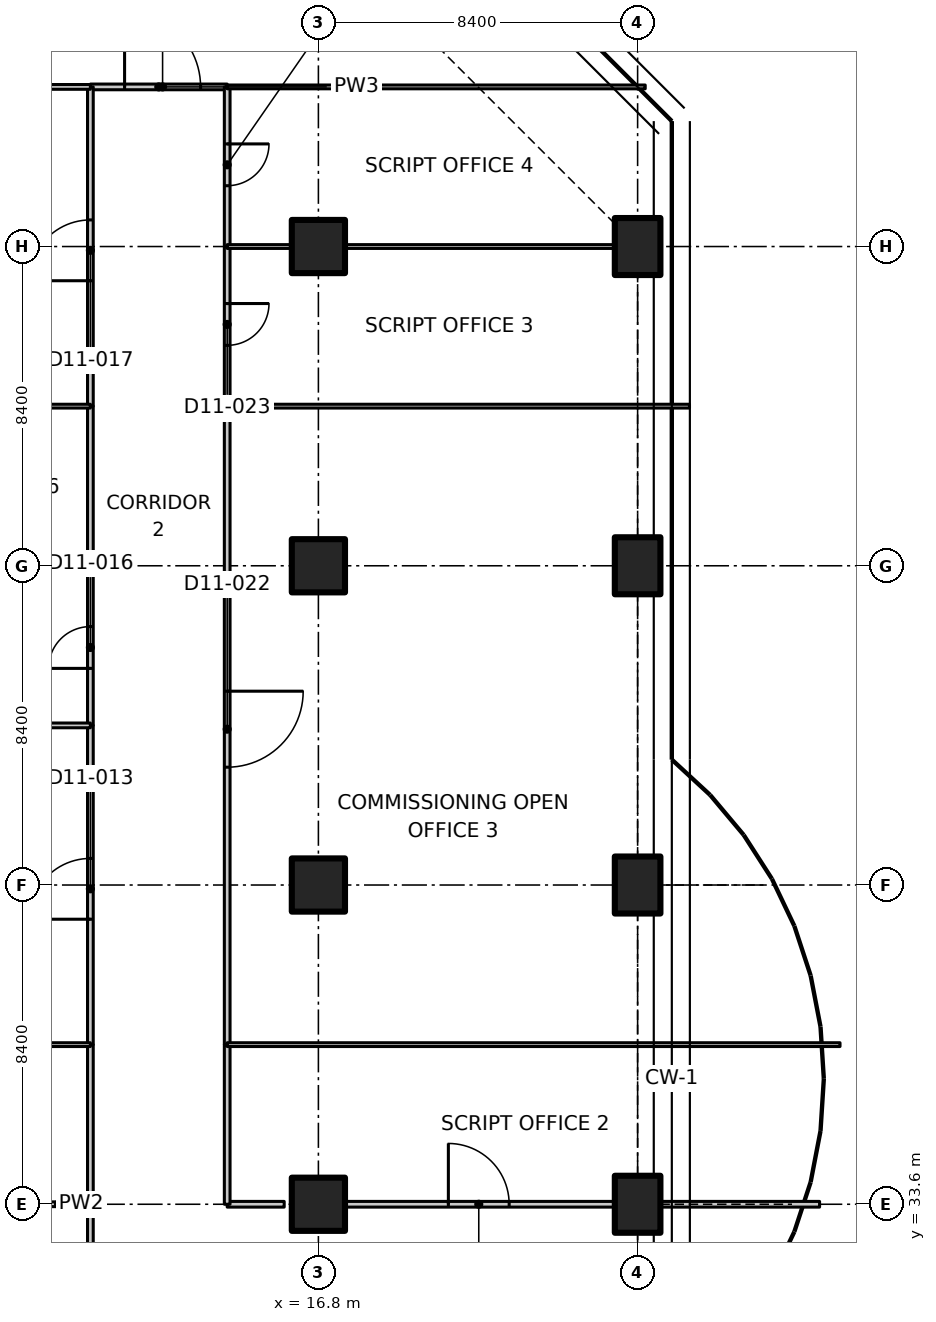
"""IFC4 building model, lengths in metres.
Left out: names, types, materials, properties, quantities, classifications, styles, units other than length and angle.
Written with IfcOpenShell. Run it as: python <this file> out.ifc"""

import sys

from ifc_helpers import new_model, si_unit, direction, frame, frame_2d, origin, origin_2d, place, context, subcontext, project, spatial, polyline, rectangle, outline, extrude, element, fill, save


model = new_model("IFC4")
c1 = context("Model", 3, precision=1e-05, world=origin(), true_north=direction((0.0, 1.0)))
c2 = subcontext(c1, "Body", "Model", "MODEL_VIEW")
j1 = project(units=[si_unit("LENGTHUNIT", "METRE"), si_unit("PLANEANGLEUNIT", "RADIAN")], contexts=[c1])
p1 = place(None, origin())
s1 = spatial("IfcSite", under=j1, at=p1, CompositionType="ELEMENT")
p2 = place(p1, origin())
s2 = spatial("IfcBuilding", under=s1, at=p2, CompositionType="ELEMENT")
p3 = place(p2, frame((0.0, 0.0, 83.3)))
s3 = spatial("IfcBuildingStorey", under=s2, at=p3, CompositionType="ELEMENT", Elevation=83.3)
for number, where, z_axis, x_axis in (
    (1, (16.8, 33.6, 0.0), (0.0, 0.0, 1.0), (1.0, 0.0, 0.0)),
    (2, (16.8, 42.0, 0.0), (0.0, 0.0, 1.0), (1.0, 0.0, 0.0)),
    (3, (16.8, 50.4, 0.0), (0.0, 0.0, 1.0), (1.0, 0.0, 0.0)),
    (4, (16.8, 58.8, 0.0), (0.0, 0.0, 1.0), (1.0, 0.0, 0.0)),
):
    element("IfcColumn", number, at=place(p3, frame(where, z_axis=z_axis, x_axis=x_axis)), inside=s3, PredefinedType="COLUMN", context=c2, shape_type="SweptSolid", body=[
        extrude(rectangle(XDim=1.4, YDim=1.4, at=origin_2d()), origin(), (0.0, 0.0, 1.0), 3.3),
    ])
for number, where, z_axis, x_axis in (
    (5, (25.2, 33.6, 0.0), (0.0, 0.0, 1.0), (1.0, 0.0, 0.0)),
    (6, (25.2, 42.0, 0.0), (0.0, 0.0, 1.0), (1.0, 0.0, 0.0)),
    (7, (25.2, 50.4, 0.0), (0.0, 0.0, 1.0), (1.0, 0.0, 0.0)),
    (8, (25.2, 58.8, 0.0), (0.0, 0.0, 1.0), (1.0, 0.0, 0.0)),
):
    element("IfcColumn", number, at=place(p3, frame(where, z_axis=z_axis, x_axis=x_axis)), inside=s3, PredefinedType="COLUMN", context=c2, shape_type="SweptSolid", body=[
        extrude(rectangle(XDim=1.2, YDim=1.5, at=origin_2d()), origin(), (0.0, 0.0, 1.0), 3.3),
    ])
p4 = place(p3, frame((10.8, 25.2, 0.0), z_axis=(0.0, 0.0, 1.0), x_axis=(0.0, 1.0, 0.0)))
e9 = element("IfcWall", 9, at=p4, inside=s3, PredefinedType="PARTITIONING", context=c2, shape_type="SweptSolid", body=[
    extrude(rectangle(XDim=8.4, YDim=0.15, at=frame_2d((4.2, 0.0))), origin(), (0.0, 0.0, 1.0), 3.28),
])
p5 = place(p4, frame((3.3, 0.0, 0.0)))
e10 = element("IfcOpeningElement", 10, at=p5, cuts=e9, PredefinedType="OPENING", context=c2, shape_type="SweptSolid", body=[
    extrude(rectangle(XDim=1.6, YDim=2.1, at=frame_2d((0.8, 1.05))), frame((0.0, 0.085, 0.0), z_axis=(0.0, -1.0, 0.0), x_axis=(1.0, 0.0, 0.0)), (0.0, 0.0, 1.0), 0.17),
])
p6 = place(p3, frame((14.4, 33.6, 0.0), z_axis=(0.0, 0.0, 1.0), x_axis=(1.0, 0.0, 0.0)))
e11 = element("IfcWall", 11, at=p6, inside=s3, PredefinedType="PARTITIONING", context=c2, shape_type="SweptSolid", body=[
    extrude(rectangle(XDim=1.5, YDim=0.15, at=frame_2d((0.75, 0.0))), origin(), (0.0, 0.0, 1.0), 3.28),
])
p7 = place(p3, frame((17.52, 33.6, 0.0), z_axis=(0.0, 0.0, 1.0), x_axis=(1.0, 0.0, 0.0)))
e12 = element("IfcWall", 12, at=p7, inside=s3, PredefinedType="PARTITIONING", context=c2, shape_type="SweptSolid", body=[
    extrude(rectangle(XDim=7.06, YDim=0.15, at=frame_2d((3.53, 0.0))), origin(), (0.0, 0.0, 1.0), 3.28),
])
p8 = place(p7, frame((2.7, 0.0, 0.0)))
e13 = element("IfcOpeningElement", 13, at=p8, cuts=e12, PredefinedType="OPENING", context=c2, shape_type="SweptSolid", body=[
    extrude(rectangle(XDim=1.6, YDim=2.1, at=frame_2d((0.8, 1.05))), frame((0.0, 0.085, 0.0), z_axis=(0.0, -1.0, 0.0), x_axis=(1.0, 0.0, 0.0)), (0.0, 0.0, 1.0), 0.17),
])
p9 = place(p3, frame((25.82, 33.6, 0.0), z_axis=(0.0, 0.0, 1.0), x_axis=(1.0, 0.0, 0.0)))
e14 = element("IfcWall", 14, at=p9, inside=s3, PredefinedType="PARTITIONING", context=c2, shape_type="SweptSolid", body=[
    extrude(rectangle(XDim=4.168, YDim=0.15, at=frame_2d((2.084, 0.0))), origin(), (0.0, 0.0, 1.0), 2.93),
])
p10 = place(p3, frame((10.8, 63.0, 0.0), z_axis=(0.0, 0.0, 1.0), x_axis=(1.0, 0.0, 0.0)))
e15 = element("IfcWall", 15, at=p10, inside=s3, PredefinedType="PARTITIONING", context=c2, shape_type="SweptSolid", body=[
    extrude(rectangle(XDim=3.6, YDim=0.15, at=frame_2d((1.8, 0.0))), origin(), (0.0, 0.0, 1.0), 3.28),
])
p11 = place(p10, frame((0.9, 0.0, 0.0)))
e16 = element("IfcOpeningElement", 16, at=p11, cuts=e15, PredefinedType="OPENING", context=c2, shape_type="SweptSolid", body=[
    extrude(rectangle(XDim=2.0, YDim=2.4, at=frame_2d((1.0, 1.2))), frame((0.0, 0.085, 0.0), z_axis=(0.0, -1.0, 0.0), x_axis=(1.0, 0.0, 0.0)), (0.0, 0.0, 1.0), 0.17),
])
p12 = place(p3, frame((10.8, 37.8, 0.0), z_axis=(0.0, 0.0, 1.0), x_axis=(0.0, 1.0, 0.0)))
e17 = element("IfcWall", 17, at=p12, inside=s3, PredefinedType="PARTITIONING", context=c2, shape_type="SweptSolid", body=[
    extrude(rectangle(XDim=8.4, YDim=0.15, at=frame_2d((4.2, 0.0))), origin(), (0.0, 0.0, 1.0), 3.28),
])
p13 = place(p12, frame((3.3, 0.0, 0.0)))
e18 = element("IfcOpeningElement", 18, at=p13, cuts=e17, PredefinedType="OPENING", context=c2, shape_type="SweptSolid", body=[
    extrude(rectangle(XDim=1.6, YDim=2.1, at=frame_2d((0.8, 1.05))), frame((0.0, 0.085, 0.0), z_axis=(0.0, -1.0, 0.0), x_axis=(1.0, 0.0, 0.0)), (0.0, 0.0, 1.0), 0.17),
])
p14 = place(p3, frame((10.8, 33.6, 0.0), z_axis=(0.0, 0.0, 1.0), x_axis=(0.0, 1.0, 0.0)))
e19 = element("IfcWall", 19, at=p14, inside=s3, PredefinedType="PARTITIONING", context=c2, shape_type="SweptSolid", body=[
    extrude(rectangle(XDim=4.2, YDim=0.15, at=frame_2d((2.1, 0.0))), origin(), (0.0, 0.0, 1.0), 3.28),
])
p15 = place(p3, frame((10.8, 46.2, 0.0), z_axis=(0.0, 0.0, 1.0), x_axis=(0.0, 1.0, 0.0)))
e20 = element("IfcWall", 20, at=p15, inside=s3, PredefinedType="PARTITIONING", context=c2, shape_type="SweptSolid", body=[
    extrude(rectangle(XDim=4.2, YDim=0.15, at=frame_2d((2.1, 0.0))), origin(), (0.0, 0.0, 1.0), 3.28),
])
p16 = place(p15, frame((1.5, 0.0, 0.0)))
e21 = element("IfcOpeningElement", 21, at=p16, cuts=e20, PredefinedType="OPENING", context=c2, shape_type="SweptSolid", body=[
    extrude(rectangle(XDim=1.1, YDim=2.1, at=frame_2d((0.55, 1.05))), frame((0.0, 0.085, 0.0), z_axis=(0.0, -1.0, 0.0), x_axis=(1.0, 0.0, 0.0)), (0.0, 0.0, 1.0), 0.17),
])
p17 = place(p3, frame((10.8, 54.6, 0.0), z_axis=(0.0, 0.0, 1.0), x_axis=(0.0, 1.0, 0.0)))
e22 = element("IfcWall", 22, at=p17, inside=s3, PredefinedType="PARTITIONING", context=c2, shape_type="SweptSolid", body=[
    extrude(rectangle(XDim=8.4, YDim=0.15, at=frame_2d((4.2, 0.0))), origin(), (0.0, 0.0, 1.0), 3.28),
])
p18 = place(p17, frame((3.3, 0.0, 0.0)))
e23 = element("IfcOpeningElement", 23, at=p18, cuts=e22, PredefinedType="OPENING", context=c2, shape_type="SweptSolid", body=[
    extrude(rectangle(XDim=1.6, YDim=2.1, at=frame_2d((0.8, 1.05))), frame((0.0, 0.085, 0.0), z_axis=(0.0, -1.0, 0.0), x_axis=(1.0, 0.0, 0.0)), (0.0, 0.0, 1.0), 0.17),
])
p19 = place(p3, frame((10.8, 50.4, 0.0), z_axis=(0.0, 0.0, 1.0), x_axis=(0.0, 1.0, 0.0)))
e24 = element("IfcWall", 24, at=p19, inside=s3, PredefinedType="PARTITIONING", context=c2, shape_type="SweptSolid", body=[
    extrude(rectangle(XDim=4.2, YDim=0.15, at=frame_2d((2.1, 0.0))), origin(), (0.0, 0.0, 1.0), 3.28),
])
p20 = place(p3, frame((14.4, 37.8, 0.0), z_axis=(0.0, 0.0, 1.0), x_axis=(0.0, -1.0, 0.0)))
e25 = element("IfcWall", 25, at=p20, inside=s3, PredefinedType="PARTITIONING", context=c2, shape_type="SweptSolid", body=[
    extrude(rectangle(XDim=4.2, YDim=0.15, at=frame_2d((2.1, 0.0))), origin(), (0.0, 0.0, 1.0), 3.28),
])
p21 = place(p3, frame((14.4, 54.6, 0.0), z_axis=(0.0, 0.0, 1.0), x_axis=(0.0, -1.0, 0.0)))
e26 = element("IfcWall", 26, at=p21, inside=s3, PredefinedType="PARTITIONING", context=c2, shape_type="SweptSolid", body=[
    extrude(rectangle(XDim=16.8, YDim=0.15, at=frame_2d((8.4, 0.0))), origin(), (0.0, 0.0, 1.0), 3.28),
])
p22 = place(p21, frame((7.5, 0.0, 0.0)))
e27 = element("IfcOpeningElement", 27, at=p22, cuts=e26, PredefinedType="OPENING", context=c2, shape_type="SweptSolid", body=[
    extrude(rectangle(XDim=2.0, YDim=2.4, at=frame_2d((1.0, 1.2))), frame((0.0, 0.085, 0.0), z_axis=(0.0, -1.0, 0.0), x_axis=(1.0, 0.0, 0.0)), (0.0, 0.0, 1.0), 0.17),
])
p23 = place(p3, frame((14.4, 58.8, 0.0), z_axis=(0.0, 0.0, 1.0), x_axis=(0.0, -1.0, 0.0)))
e28 = element("IfcWall", 28, at=p23, inside=s3, PredefinedType="PARTITIONING", context=c2, shape_type="SweptSolid", body=[
    extrude(rectangle(XDim=4.2, YDim=0.15, at=frame_2d((2.1, 0.0))), origin(), (0.0, 0.0, 1.0), 3.28),
])
p24 = place(p23, frame((1.5, 0.0, 0.0)))
e29 = element("IfcOpeningElement", 29, at=p24, cuts=e28, PredefinedType="OPENING", context=c2, shape_type="SweptSolid", body=[
    extrude(rectangle(XDim=1.1, YDim=2.1, at=frame_2d((0.55, 1.05))), frame((0.0, 0.085, 0.0), z_axis=(0.0, -1.0, 0.0), x_axis=(1.0, 0.0, 0.0)), (0.0, 0.0, 1.0), 0.17),
])
p25 = place(p3, frame((14.4, 63.0, 0.0), z_axis=(0.0, 0.0, 1.0), x_axis=(0.0, -1.0, 0.0)))
e30 = element("IfcWall", 30, at=p25, inside=s3, PredefinedType="PARTITIONING", context=c2, shape_type="SweptSolid", body=[
    extrude(rectangle(XDim=4.2, YDim=0.15, at=frame_2d((2.1, 0.0))), origin(), (0.0, 0.0, 1.0), 3.28),
])
p26 = place(p25, frame((1.5, 0.0, 0.0)))
e31 = element("IfcOpeningElement", 31, at=p26, cuts=e30, PredefinedType="OPENING", context=c2, shape_type="SweptSolid", body=[
    extrude(rectangle(XDim=1.1, YDim=2.1, at=frame_2d((0.55, 1.05))), frame((0.0, 0.085, 0.0), z_axis=(0.0, -1.0, 0.0), x_axis=(1.0, 0.0, 0.0)), (0.0, 0.0, 1.0), 0.17),
])
p27 = place(p3, frame((10.8, 63.0, 0.0), z_axis=(0.0, 0.0, 1.0), x_axis=(-1.0, 0.0, 0.0)))
e32 = element("IfcWall", 32, at=p27, inside=s3, PredefinedType="PARTITIONING", context=c2, shape_type="SweptSolid", body=[
    extrude(outline(polyline([(0.0, 0.0), (11.0, 0.0), (11.0, 3.28), (7.278, 3.28), (7.276, 2.93), (5.924, 2.93), (5.922, 3.28), (0.0, 3.28), (0.0, 0.0)])), frame((0.0, 0.062, 0.0), z_axis=(0.0, -1.0, 0.0), x_axis=(1.0, 0.0, 0.0)), (0.0, 0.0, 1.0), 0.125),
])
p28 = place(p3, frame((25.4, 63.0, 0.0), z_axis=(0.0, 0.0, 1.0), x_axis=(-1.0, 0.0, 0.0)))
e33 = element("IfcWall", 33, at=p28, inside=s3, PredefinedType="PARTITIONING", context=c2, shape_type="SweptSolid", body=[
    extrude(outline(polyline([(0.0, 0.0), (11.0, 0.0), (11.0, 3.28), (5.066, 3.28), (5.064, 2.93), (3.736, 2.93), (3.734, 3.28), (0.0, 3.28), (0.0, 0.0)])), frame((0.0, 0.05, 0.0), z_axis=(0.0, -1.0, 0.0), x_axis=(1.0, 0.0, 0.0)), (0.0, 0.0, 1.0), 0.1),
])
p29 = place(p3, frame((9.12, 33.6, 0.0), z_axis=(0.0, 0.0, 1.0), x_axis=(1.0, 0.0, 0.0)))
e34 = element("IfcWall", 34, at=p29, inside=s3, PredefinedType="PARTITIONING", context=c2, shape_type="SweptSolid", body=[
    extrude(rectangle(XDim=1.68, YDim=0.125, at=frame_2d((0.84, 0.0))), origin(), (0.0, 0.0, 1.0), 3.28),
])
p30 = place(p3, frame((10.8, 37.8, 0.0), z_axis=(0.0, 0.0, 1.0), x_axis=(-1.0, 0.0, 0.0)))
e35 = element("IfcWall", 35, at=p30, inside=s3, PredefinedType="PARTITIONING", context=c2, shape_type="SweptSolid", body=[
    extrude(rectangle(XDim=9.0, YDim=0.1, at=frame_2d((4.5, 0.0))), origin(), (0.0, 0.0, 1.0), 3.28),
])
p31 = place(p30, frame((3.9, 0.0, 0.0)))
e36 = element("IfcOpeningElement", 36, at=p31, cuts=e35, PredefinedType="OPENING", context=c2, shape_type="SweptSolid", body=[
    extrude(rectangle(XDim=1.0, YDim=2.1, at=frame_2d((0.5, 1.05))), frame((0.0, 0.06, 0.0), z_axis=(0.0, -1.0, 0.0), x_axis=(1.0, 0.0, 0.0)), (0.0, 0.0, 1.0), 0.12),
])
p32 = place(p3, frame((-1.365, 46.2, 0.0), z_axis=(0.0, 0.0, 1.0), x_axis=(1.0, 0.0, 0.0)))
e37 = element("IfcWall", 37, at=p32, inside=s3, PredefinedType="PARTITIONING", context=c2, shape_type="SweptSolid", body=[
    extrude(outline(polyline([(0.0, 0.0), (12.165, 0.0), (12.165, 3.28), (1.815, 3.28), (1.813, 2.93), (0.917, 2.93), (0.915, 3.28), (0.265, 3.28), (0.0, 3.28), (0.0, 0.0)])), frame((0.0, 0.062, 0.0), z_axis=(0.0, -1.0, 0.0), x_axis=(1.0, 0.0, 0.0)), (0.0, 0.0, 1.0), 0.125),
])
p33 = place(p3, frame((9.12, 50.4, 0.0), z_axis=(0.0, 0.0, 1.0), x_axis=(1.0, 0.0, 0.0)))
e38 = element("IfcWall", 38, at=p33, inside=s3, PredefinedType="PARTITIONING", context=c2, shape_type="SweptSolid", body=[
    extrude(rectangle(XDim=1.68, YDim=0.125, at=frame_2d((0.84, 0.0))), origin(), (0.0, 0.0, 1.0), 3.28),
])
p34 = place(p3, frame((10.8, 54.6, 0.0), z_axis=(0.0, 0.0, 1.0), x_axis=(-1.0, 0.0, 0.0)))
e39 = element("IfcWall", 39, at=p34, inside=s3, PredefinedType="PARTITIONING", context=c2, shape_type="SweptSolid", body=[
    extrude(rectangle(XDim=4.2, YDim=0.1, at=frame_2d((2.1, 0.0))), origin(), (0.0, 0.0, 1.0), 3.28),
])
p35 = place(p3, frame((14.4, 37.8, 0.0), z_axis=(0.0, 0.0, 1.0), x_axis=(1.0, 0.0, 0.0)))
e40 = element("IfcWall", 40, at=p35, inside=s3, PredefinedType="PARTITIONING", context=c2, shape_type="SweptSolid", body=[
    extrude(outline(polyline([(0.0, 0.0), (16.126, 0.0), (16.126, 3.28), (15.843, 3.28), (11.25, 3.28), (11.248, 2.93), (10.352, 2.93), (10.35, 3.28), (0.0, 3.28), (0.0, 0.0)])), frame((0.0, 0.05, 0.0), z_axis=(0.0, -1.0, 0.0), x_axis=(1.0, 0.0, 0.0)), (0.0, 0.0, 1.0), 0.1),
])
p36 = place(p3, frame((14.4, 54.6, 0.0), z_axis=(0.0, 0.0, 1.0), x_axis=(1.0, 0.0, 0.0)))
e41 = element("IfcWall", 41, at=p36, inside=s3, PredefinedType="PARTITIONING", context=c2, shape_type="SweptSolid", body=[
    extrude(outline(polyline([(0.0, 0.0), (12.165, 0.0), (12.165, 3.28), (11.9, 3.28), (11.25, 3.28), (11.248, 2.93), (10.352, 2.93), (10.35, 3.28), (0.0, 3.28), (0.0, 0.0)])), frame((0.0, 0.05, 0.0), z_axis=(0.0, -1.0, 0.0), x_axis=(1.0, 0.0, 0.0)), (0.0, 0.0, 1.0), 0.1),
])
p37 = place(p3, frame((14.4, 58.8, 0.0), z_axis=(0.0, 0.0, 1.0), x_axis=(1.0, 0.0, 0.0)))
e42 = element("IfcWall", 42, at=p37, inside=s3, PredefinedType="PARTITIONING", context=c2, shape_type="SweptSolid", body=[
    extrude(rectangle(XDim=1.68, YDim=0.1, at=frame_2d((0.84, 0.0))), origin(), (0.0, 0.0, 1.0), 3.28),
])
p38 = place(p3, frame((17.52, 58.8, 0.0), z_axis=(0.0, 0.0, 1.0), x_axis=(1.0, 0.0, 0.0)))
e43 = element("IfcWall", 43, at=p38, inside=s3, PredefinedType="PARTITIONING", context=c2, shape_type="SweptSolid", body=[
    extrude(rectangle(XDim=7.06, YDim=0.1, at=frame_2d((3.53, 0.0))), origin(), (0.0, 0.0, 1.0), 3.28),
])
p39 = place(p11, origin())
e44 = element("IfcDoor", 44, at=p39, inside=s3, OperationType="DOUBLE_DOOR_SINGLE_SWING", PredefinedType="DOOR", context=c2, shape_type="SweptSolid", body=[
    extrude(rectangle(XDim=2.0, YDim=2.4, at=frame_2d((1.0, 1.2))), frame((0.0, 0.025, 0.0), z_axis=(0.0, -1.0, 0.0), x_axis=(1.0, 0.0, 0.0)), (0.0, 0.0, 1.0), 0.05),
])
fill(e16, e44)
p40 = place(p13, origin())
e45 = element("IfcDoor", 45, at=p40, inside=s3, OperationType="DOUBLE_DOOR_SINGLE_SWING", PredefinedType="DOOR", context=c2, shape_type="SweptSolid", body=[
    extrude(rectangle(XDim=1.6, YDim=2.1, at=frame_2d((0.8, 1.05))), frame((0.0, 0.025, 0.0), z_axis=(0.0, -1.0, 0.0), x_axis=(1.0, 0.0, 0.0)), (0.0, 0.0, 1.0), 0.05),
])
fill(e18, e45)
p41 = place(p16, origin())
e46 = element("IfcDoor", 46, at=p41, inside=s3, OperationType="SINGLE_SWING_LEFT", PredefinedType="DOOR", context=c2, shape_type="SweptSolid", body=[
    extrude(rectangle(XDim=1.1, YDim=2.1, at=frame_2d((0.55, 1.05))), frame((0.0, 0.025, 0.0), z_axis=(0.0, -1.0, 0.0), x_axis=(1.0, 0.0, 0.0)), (0.0, 0.0, 1.0), 0.05),
])
fill(e21, e46)
p42 = place(p18, origin())
e47 = element("IfcDoor", 47, at=p42, inside=s3, OperationType="DOUBLE_DOOR_SINGLE_SWING", PredefinedType="DOOR", context=c2, shape_type="SweptSolid", body=[
    extrude(rectangle(XDim=1.6, YDim=2.1, at=frame_2d((0.8, 1.05))), frame((0.0, 0.025, 0.0), z_axis=(0.0, -1.0, 0.0), x_axis=(1.0, 0.0, 0.0)), (0.0, 0.0, 1.0), 0.05),
])
fill(e23, e47)
p43 = place(p8, origin())
e48 = element("IfcDoor", 48, at=p43, inside=s3, OperationType="DOUBLE_DOOR_SINGLE_SWING", PredefinedType="DOOR", context=c2, shape_type="SweptSolid", body=[
    extrude(rectangle(XDim=1.6, YDim=2.1, at=frame_2d((0.8, 1.05))), frame((0.0, 0.025, 0.0), z_axis=(0.0, -1.0, 0.0), x_axis=(1.0, 0.0, 0.0)), (0.0, 0.0, 1.0), 0.05),
])
fill(e13, e48)
p44 = place(p22, origin())
e49 = element("IfcDoor", 49, at=p44, inside=s3, OperationType="DOUBLE_DOOR_SINGLE_SWING", PredefinedType="DOOR", context=c2, shape_type="SweptSolid", body=[
    extrude(rectangle(XDim=2.0, YDim=2.4, at=frame_2d((1.0, 1.2))), frame((0.0, 0.025, 0.0), z_axis=(0.0, -1.0, 0.0), x_axis=(1.0, 0.0, 0.0)), (0.0, 0.0, 1.0), 0.05),
])
fill(e27, e49)
p45 = place(p24, origin())
e50 = element("IfcDoor", 50, at=p45, inside=s3, OperationType="SINGLE_SWING_LEFT", PredefinedType="DOOR", context=c2, shape_type="SweptSolid", body=[
    extrude(rectangle(XDim=1.1, YDim=2.1, at=frame_2d((0.55, 1.05))), frame((0.0, 0.025, 0.0), z_axis=(0.0, -1.0, 0.0), x_axis=(1.0, 0.0, 0.0)), (0.0, 0.0, 1.0), 0.05),
])
fill(e29, e50)
p46 = place(p26, origin())
e51 = element("IfcDoor", 51, at=p46, inside=s3, OperationType="SINGLE_SWING_LEFT", PredefinedType="DOOR", context=c2, shape_type="SweptSolid", body=[
    extrude(rectangle(XDim=1.1, YDim=2.1, at=frame_2d((0.55, 1.05))), frame((0.0, 0.025, 0.0), z_axis=(0.0, -1.0, 0.0), x_axis=(1.0, 0.0, 0.0)), (0.0, 0.0, 1.0), 0.05),
])
fill(e31, e51)
save(model, sys.argv[1])
